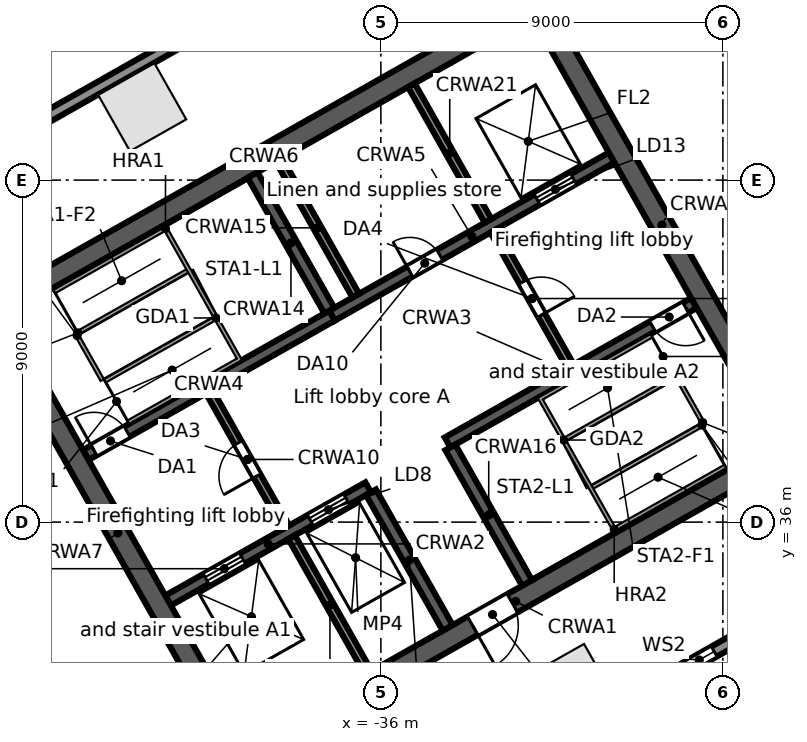
"""IFC4 building model, lengths in metres.
Left out: names, types, materials, properties, quantities, classifications, styles, units other than length and angle.
Written with IfcOpenShell. Run it as: python <this file> out.ifc"""

import sys

from ifc_helpers import new_model, si_unit, direction, frame, frame_2d, origin, origin_2d, place, context, subcontext, project, spatial, rectangle, extrude, element, fill, save


model = new_model("IFC4")
c1 = context("Model", 3, precision=1e-05, world=origin(), true_north=direction((0.0, 1.0)))
c2 = subcontext(c1, "Body", "Model", "MODEL_VIEW")
j1 = project(units=[si_unit("LENGTHUNIT", "METRE"), si_unit("PLANEANGLEUNIT", "RADIAN")], contexts=[c1])
p1 = place(None, origin())
s1 = spatial("IfcSite", under=j1, at=p1, CompositionType="ELEMENT")
p2 = place(p1, origin())
s2 = spatial("IfcBuilding", under=s1, at=p2, CompositionType="ELEMENT")
p3 = place(p2, frame((0.0, 0.0, 145.5)))
s3 = spatial("IfcBuildingStorey", under=s2, at=p3, CompositionType="ELEMENT", Elevation=145.5)
for number, where, z_axis, x_axis in (
    (1, (-42.28, 46.919, 0.0), (0.0, 0.0, 1.0), (-0.87, -0.492, 0.0)),
    (2, (-30.976, 31.635, 0.0), (0.0, 0.0, 1.0), (0.87, 0.492, 0.0)),
):
    element("IfcColumn", number, at=place(p3, frame(where, z_axis=z_axis, x_axis=x_axis)), inside=s3, PredefinedType="COLUMN", context=c2, shape_type="SweptSolid", body=[
        extrude(rectangle(XDim=1.7, YDim=1.7, at=origin_2d()), origin(), (0.0, 0.0, 1.0), 4.4),
    ])
p4 = place(p3, frame((-58.745, 38.764, 0.0), z_axis=(0.0, 0.0, 1.0), x_axis=(0.870355811726, 0.492423355453, 0.0)))
e3 = element("IfcWall", 3, at=p4, inside=s3, PredefinedType="STANDARD", context=c2, shape_type="SweptSolid", body=[
    extrude(rectangle(XDim=64.025, YDim=0.3, at=frame_2d((32.013, 0.0))), origin(), (0.0, 0.0, 1.0), 4.05),
])
p5 = place(p4, frame((60.122, 0.0, 0.6)))
e4 = element("IfcOpeningElement", 4, at=p5, cuts=e3, PredefinedType="OPENING", context=c2, shape_type="SweptSolid", body=[
    extrude(rectangle(XDim=0.9, YDim=2.8, at=frame_2d((0.45, 1.4))), frame((0.0, 0.16, 0.0), z_axis=(0.0, -1.0, 0.0), x_axis=(1.0, 0.0, 0.0)), (0.0, 0.0, 1.0), 0.32),
])
p6 = place(p4, frame((50.992, 0.0, 0.6)))
e5 = element("IfcOpeningElement", 5, at=p6, cuts=e3, PredefinedType="OPENING", context=c2, shape_type="SweptSolid", body=[
    extrude(rectangle(XDim=0.9, YDim=2.8, at=frame_2d((0.45, 1.4))), frame((0.0, 0.16, 0.0), z_axis=(0.0, -1.0, 0.0), x_axis=(1.0, 0.0, 0.0)), (0.0, 0.0, 1.0), 0.32),
])
p7 = place(p4, frame((41.862, 0.0, 0.6)))
e6 = element("IfcOpeningElement", 6, at=p7, cuts=e3, PredefinedType="OPENING", context=c2, shape_type="SweptSolid", body=[
    extrude(rectangle(XDim=0.9, YDim=2.8, at=frame_2d((0.45, 1.4))), frame((0.0, 0.16, 0.0), z_axis=(0.0, -1.0, 0.0), x_axis=(1.0, 0.0, 0.0)), (0.0, 0.0, 1.0), 0.32),
])
p8 = place(p4, frame((32.732, 0.0, 0.6)))
e7 = element("IfcOpeningElement", 7, at=p8, cuts=e3, PredefinedType="OPENING", context=c2, shape_type="SweptSolid", body=[
    extrude(rectangle(XDim=0.9, YDim=2.8, at=frame_2d((0.45, 1.4))), frame((0.0, 0.16, 0.0), z_axis=(0.0, -1.0, 0.0), x_axis=(1.0, 0.0, 0.0)), (0.0, 0.0, 1.0), 0.32),
])
p9 = place(p4, frame((23.602, 0.0, 0.6)))
e8 = element("IfcOpeningElement", 8, at=p9, cuts=e3, PredefinedType="OPENING", context=c2, shape_type="SweptSolid", body=[
    extrude(rectangle(XDim=0.9, YDim=2.8, at=frame_2d((0.45, 1.4))), frame((0.0, 0.16, 0.0), z_axis=(0.0, -1.0, 0.0), x_axis=(1.0, 0.0, 0.0)), (0.0, 0.0, 1.0), 0.32),
])
p10 = place(p4, frame((14.472, 0.0, 0.6)))
e9 = element("IfcOpeningElement", 9, at=p10, cuts=e3, PredefinedType="OPENING", context=c2, shape_type="SweptSolid", body=[
    extrude(rectangle(XDim=0.9, YDim=2.8, at=frame_2d((0.45, 1.4))), frame((0.0, 0.16, 0.0), z_axis=(0.0, -1.0, 0.0), x_axis=(1.0, 0.0, 0.0)), (0.0, 0.0, 1.0), 0.32),
])
p11 = place(p4, frame((5.342, 0.0, 0.6)))
e10 = element("IfcOpeningElement", 10, at=p11, cuts=e3, PredefinedType="OPENING", context=c2, shape_type="SweptSolid", body=[
    extrude(rectangle(XDim=0.9, YDim=2.8, at=frame_2d((0.45, 1.4))), frame((0.0, 0.16, 0.0), z_axis=(0.0, -1.0, 0.0), x_axis=(1.0, 0.0, 0.0)), (0.0, 0.0, 1.0), 0.32),
])
p12 = place(p3, frame((-44.109, 26.504, 0.0), z_axis=(0.0, 0.0, 1.0), x_axis=(-0.857169502585, 0.515034410344, 0.0)))
e11 = element("IfcWall", 11, at=p12, inside=s3, PredefinedType="STANDARD", context=c2, shape_type="SweptSolid", body=[
    extrude(rectangle(XDim=17.127, YDim=0.3, at=frame_2d((8.563, 0.0))), origin(), (0.0, 0.0, 1.0), 4.05),
])
p13 = place(p12, frame((13.403, 0.0, 0.6)))
e12 = element("IfcOpeningElement", 12, at=p13, cuts=e11, PredefinedType="OPENING", context=c2, shape_type="SweptSolid", body=[
    extrude(rectangle(XDim=0.9, YDim=2.8, at=frame_2d((0.45, 1.4))), frame((0.0, 0.16, 0.0), z_axis=(0.0, -1.0, 0.0), x_axis=(1.0, 0.0, 0.0)), (0.0, 0.0, 1.0), 0.32),
])
p14 = place(p12, frame((4.903, 0.0, 0.6)))
e13 = element("IfcOpeningElement", 13, at=p14, cuts=e11, PredefinedType="OPENING", context=c2, shape_type="SweptSolid", body=[
    extrude(rectangle(XDim=0.9, YDim=2.8, at=frame_2d((0.45, 1.4))), frame((0.0, 0.16, 0.0), z_axis=(0.0, -1.0, 0.0), x_axis=(1.0, 0.0, 0.0)), (0.0, 0.0, 1.0), 0.32),
])
p15 = place(p3, frame((-0.055, 47.969, 0.0), z_axis=(0.0, 0.0, 1.0), x_axis=(-0.870355730478, -0.492423499058, 0.0)))
e14 = element("IfcWall", 14, at=p15, inside=s3, PredefinedType="STANDARD", context=c2, shape_type="SweptSolid", body=[
    extrude(rectangle(XDim=43.75, YDim=0.3, at=frame_2d((21.875, 0.0))), origin(), (0.0, 0.0, 1.0), 4.05),
])
p16 = place(p15, frame((39.977, 0.0, 0.6)))
e15 = element("IfcOpeningElement", 15, at=p16, cuts=e14, PredefinedType="OPENING", context=c2, shape_type="SweptSolid", body=[
    extrude(rectangle(XDim=0.9, YDim=2.8, at=frame_2d((0.45, 1.4))), frame((0.0, 0.16, 0.0), z_axis=(0.0, -1.0, 0.0), x_axis=(1.0, 0.0, 0.0)), (0.0, 0.0, 1.0), 0.32),
])
p17 = place(p15, frame((31.222, 0.0, 0.6)))
e16 = element("IfcOpeningElement", 16, at=p17, cuts=e14, PredefinedType="OPENING", context=c2, shape_type="SweptSolid", body=[
    extrude(rectangle(XDim=0.9, YDim=2.8, at=frame_2d((0.45, 1.4))), frame((0.0, 0.16, 0.0), z_axis=(0.0, -1.0, 0.0), x_axis=(1.0, 0.0, 0.0)), (0.0, 0.0, 1.0), 0.32),
])
p18 = place(p15, frame((22.468, 0.0, 0.6)))
e17 = element("IfcOpeningElement", 17, at=p18, cuts=e14, PredefinedType="OPENING", context=c2, shape_type="SweptSolid", body=[
    extrude(rectangle(XDim=0.9, YDim=2.8, at=frame_2d((0.45, 1.4))), frame((0.0, 0.16, 0.0), z_axis=(0.0, -1.0, 0.0), x_axis=(1.0, 0.0, 0.0)), (0.0, 0.0, 1.0), 0.32),
])
p19 = place(p15, frame((13.713, 0.0, 0.6)))
e18 = element("IfcOpeningElement", 18, at=p19, cuts=e14, PredefinedType="OPENING", context=c2, shape_type="SweptSolid", body=[
    extrude(rectangle(XDim=0.9, YDim=2.8, at=frame_2d((0.45, 1.4))), frame((0.0, 0.16, 0.0), z_axis=(0.0, -1.0, 0.0), x_axis=(1.0, 0.0, 0.0)), (0.0, 0.0, 1.0), 0.32),
])
p20 = place(p15, frame((4.959, 0.0, 0.6)))
e19 = element("IfcOpeningElement", 19, at=p20, cuts=e14, PredefinedType="OPENING", context=c2, shape_type="SweptSolid", body=[
    extrude(rectangle(XDim=0.9, YDim=2.8, at=frame_2d((0.45, 1.4))), frame((0.0, 0.16, 0.0), z_axis=(0.0, -1.0, 0.0), x_axis=(1.0, 0.0, 0.0)), (0.0, 0.0, 1.0), 0.32),
])
p21 = place(p3, frame((-39.85, 29.727, 0.0), z_axis=(0.0, 0.0, 1.0), x_axis=(0.870359753402, 0.492416388494, 0.0)))
e20 = element("IfcWall", 20, at=p21, inside=s3, PredefinedType="SOLIDWALL", context=c2, shape_type="SweptSolid", body=[
    extrude(rectangle(XDim=17.0, YDim=0.55, at=frame_2d((8.5, 0.0))), origin(), (0.0, 0.0, 1.0), 4.05),
])
p22 = place(p21, frame((7.2, 0.0, 0.0)))
e21 = element("IfcOpeningElement", 21, at=p22, cuts=e20, PredefinedType="OPENING", context=c2, shape_type="SweptSolid", body=[
    extrude(rectangle(XDim=1.2, YDim=2.1, at=frame_2d((0.6, 1.05))), frame((0.0, 0.285, 0.0), z_axis=(0.0, -1.0, 0.0), x_axis=(1.0, 0.0, 0.0)), (0.0, 0.0, 1.0), 0.57),
])
p23 = place(p3, frame((-41.6, 33.936, 0.0), z_axis=(0.0, 0.0, 1.0), x_axis=(0.870348557882, 0.492436176365, 0.0)))
e22 = element("IfcWall", 22, at=p23, inside=s3, PredefinedType="SOLIDWALL", context=c2, shape_type="SweptSolid", body=[
    extrude(rectangle(XDim=6.05, YDim=0.3, at=frame_2d((3.025, 0.0))), origin(), (0.0, 0.0, 1.0), 4.05),
])
p24 = place(p23, frame((1.15, 0.0, 0.0)))
e23 = element("IfcOpeningElement", 23, at=p24, cuts=e22, PredefinedType="OPENING", context=c2, shape_type="SweptSolid", body=[
    extrude(rectangle(XDim=1.1, YDim=2.1, at=frame_2d((0.55, 1.05))), frame((0.0, 0.16, 0.0), z_axis=(0.0, -1.0, 0.0), x_axis=(1.0, 0.0, 0.0)), (0.0, 0.0, 1.0), 0.32),
])
p25 = place(p23, frame((4.3, 0.0, 0.0)))
e24 = element("IfcOpeningElement", 24, at=p25, cuts=e22, PredefinedType="OPENING", context=c2, shape_type="SweptSolid", body=[
    extrude(rectangle(XDim=1.1, YDim=2.1, at=frame_2d((0.55, 1.05))), frame((0.0, 0.16, 0.0), z_axis=(0.0, -1.0, 0.0), x_axis=(1.0, 0.0, 0.0)), (0.0, 0.0, 1.0), 0.32),
])
p26 = place(p3, frame((-34.245, 38.097, 0.0), z_axis=(0.0, 0.0, 1.0), x_axis=(0.870360741098, 0.49241464271, 0.0)))
e25 = element("IfcWall", 25, at=p26, inside=s3, PredefinedType="SOLIDWALL", context=c2, shape_type="SweptSolid", body=[
    extrude(rectangle(XDim=7.45, YDim=0.3, at=frame_2d((3.725, 0.0))), origin(), (0.0, 0.0, 1.0), 4.05),
])
p27 = place(p26, frame((6.2, 0.0, 0.0)))
e26 = element("IfcOpeningElement", 26, at=p27, cuts=e25, PredefinedType="OPENING", context=c2, shape_type="SweptSolid", body=[
    extrude(rectangle(XDim=1.0, YDim=2.1, at=frame_2d((0.5, 1.05))), frame((0.0, 0.16, 0.0), z_axis=(0.0, -1.0, 0.0), x_axis=(1.0, 0.0, 0.0)), (0.0, 0.0, 1.0), 0.32),
])
p28 = place(p3, frame((-43.766, 37.766, 0.0), z_axis=(0.0, 0.0, 1.0), x_axis=(0.870346696097, 0.492439466932, 0.0)))
e27 = element("IfcWall", 27, at=p28, inside=s3, PredefinedType="SOLIDWALL", context=c2, shape_type="SweptSolid", body=[
    extrude(rectangle(XDim=7.45, YDim=0.3, at=frame_2d((3.725, 0.0))), origin(), (0.0, 0.0, 1.0), 4.05),
])
p29 = place(p28, frame((0.25, 0.0, 0.0)))
e28 = element("IfcOpeningElement", 28, at=p29, cuts=e27, PredefinedType="OPENING", context=c2, shape_type="SweptSolid", body=[
    extrude(rectangle(XDim=1.0, YDim=2.1, at=frame_2d((0.5, 1.05))), frame((0.0, 0.16, 0.0), z_axis=(0.0, -1.0, 0.0), x_axis=(1.0, 0.0, 0.0)), (0.0, 0.0, 1.0), 0.32),
])
p30 = place(p3, frame((-37.282, 41.435, 0.0), z_axis=(0.0, 0.0, 1.0), x_axis=(0.870359895813, 0.492416136779, 0.0)))
e29 = element("IfcWall", 29, at=p30, inside=s3, PredefinedType="SOLIDWALL", context=c2, shape_type="SweptSolid", body=[
    extrude(rectangle(XDim=8.45, YDim=0.3, at=frame_2d((4.225, 0.0))), origin(), (0.0, 0.0, 1.0), 4.05),
])
p31 = place(p30, frame((6.2, 0.0, 0.0)))
e30 = element("IfcOpeningElement", 30, at=p31, cuts=e29, PredefinedType="OPENING", context=c2, shape_type="SweptSolid", body=[
    extrude(rectangle(XDim=1.1, YDim=2.1, at=frame_2d((0.55, 1.05))), frame((0.0, 0.16, 0.0), z_axis=(0.0, -1.0, 0.0), x_axis=(1.0, 0.0, 0.0)), (0.0, 0.0, 1.0), 0.32),
])
p32 = place(p30, frame((2.35, 0.0, 0.0)))
e31 = element("IfcOpeningElement", 31, at=p32, cuts=e29, PredefinedType="OPENING", context=c2, shape_type="SweptSolid", body=[
    extrude(rectangle(XDim=0.9, YDim=2.1, at=frame_2d((0.45, 1.05))), frame((0.0, 0.16, 0.0), z_axis=(0.0, -1.0, 0.0), x_axis=(1.0, 0.0, 0.0)), (0.0, 0.0, 1.0), 0.32),
])
p33 = place(p3, frame((-46.473, 41.434, 0.0), z_axis=(0.0, 0.0, 1.0), x_axis=(0.870359753402, 0.492416388494, 0.0)))
e32 = element("IfcWall", 32, at=p33, inside=s3, PredefinedType="SOLIDWALL", context=c2, shape_type="SweptSolid", body=[
    extrude(rectangle(XDim=17.0, YDim=0.55, at=frame_2d((8.5, 0.0))), origin(), (0.0, 0.0, 1.0), 4.05),
])
p34 = place(p3, frame((-46.098, 41.33, 0.0), z_axis=(0.0, 0.0, 1.0), x_axis=(0.492418910884, -0.870358326325, 0.0)))
e33 = element("IfcWall", 33, at=p34, inside=s3, PredefinedType="SOLIDWALL", context=c2, shape_type="SweptSolid", body=[
    extrude(rectangle(XDim=12.9, YDim=0.55, at=frame_2d((6.45, 0.0))), origin(), (0.0, 0.0, 1.0), 4.05),
])
p35 = place(p3, frame((-38.349, 35.603, 0.0), z_axis=(0.0, 0.0, 1.0), x_axis=(0.492382931784, -0.870378681085, 0.0)))
e34 = element("IfcWall", 34, at=p35, inside=s3, PredefinedType="SOLIDWALL", context=c2, shape_type="SweptSolid", body=[
    extrude(rectangle(XDim=4.1, YDim=0.2, at=frame_2d((2.05, 0.0))), origin(), (0.0, 0.0, 1.0), 4.05),
])
p36 = place(p3, frame((-40.516, 39.433, 0.0), z_axis=(0.0, 0.0, 1.0), x_axis=(0.492453559952, -0.87033872216, 0.0)))
e35 = element("IfcWall", 35, at=p36, inside=s3, PredefinedType="PARTITIONING", context=c2, shape_type="SweptSolid", body=[
    extrude(rectangle(XDim=4.1, YDim=0.2, at=frame_2d((2.05, 0.0))), origin(), (0.0, 0.0, 1.0), 4.05),
])
p37 = place(p36, frame((1.55, 0.0, 0.0)))
e36 = element("IfcOpeningElement", 36, at=p37, cuts=e35, PredefinedType="OPENING", context=c2, shape_type="SweptSolid", body=[
    extrude(rectangle(XDim=1.0, YDim=2.1, at=frame_2d((0.5, 1.05))), frame((0.0, 0.11, 0.0), z_axis=(0.0, -1.0, 0.0), x_axis=(1.0, 0.0, 0.0)), (0.0, 0.0, 1.0), 0.22),
])
p38 = place(p3, frame((-36.26, 36.785, 0.0), z_axis=(0.0, 0.0, 1.0), x_axis=(0.492408451753, -0.87036424366, 0.0)))
e37 = element("IfcWall", 37, at=p38, inside=s3, PredefinedType="SOLIDWALL", context=c2, shape_type="SweptSolid", body=[
    extrude(rectangle(XDim=4.1, YDim=0.3, at=frame_2d((2.05, 0.0))), origin(), (0.0, 0.0, 1.0), 4.05),
])
p39 = place(p3, frame((-39.375, 45.134, 0.0), z_axis=(0.0, 0.0, 1.0), x_axis=(0.492428039142, -0.870353161807, 0.0)))
e38 = element("IfcWall", 38, at=p39, inside=s3, PredefinedType="SOLIDWALL", context=c2, shape_type="SweptSolid", body=[
    extrude(rectangle(XDim=4.1, YDim=0.3, at=frame_2d((2.05, 0.0))), origin(), (0.0, 0.0, 1.0), 4.05),
])
p40 = place(p3, frame((-38.679, 45.527, 0.0), z_axis=(0.0, 0.0, 1.0), x_axis=(0.492453559952, -0.87033872216, 0.0)))
e39 = element("IfcWall", 39, at=p40, inside=s3, PredefinedType="SOLIDWALL", context=c2, shape_type="SweptSolid", body=[
    extrude(rectangle(XDim=4.1, YDim=0.2, at=frame_2d((2.05, 0.0))), origin(), (0.0, 0.0, 1.0), 4.05),
])
p41 = place(p3, frame((-34.171, 37.967, 0.0), z_axis=(0.0, 0.0, 1.0), x_axis=(0.492382931784, -0.870378681085, 0.0)))
e40 = element("IfcWall", 40, at=p41, inside=s3, PredefinedType="SOLIDWALL", context=c2, shape_type="SweptSolid", body=[
    extrude(rectangle(XDim=4.1, YDim=0.3, at=frame_2d((2.05, 0.0))), origin(), (0.0, 0.0, 1.0), 4.05),
])
p42 = place(p3, frame((-33.031, 43.667, 0.0), z_axis=(0.0, 0.0, 1.0), x_axis=(0.492408451753, -0.87036424366, 0.0)))
e41 = element("IfcWall", 41, at=p42, inside=s3, PredefinedType="PARTITIONING", context=c2, shape_type="SweptSolid", body=[
    extrude(rectangle(XDim=4.1, YDim=0.2, at=frame_2d((2.05, 0.0))), origin(), (0.0, 0.0, 1.0), 4.05),
])
p43 = place(p42, frame((1.55, 0.0, 0.0)))
e42 = element("IfcOpeningElement", 42, at=p43, cuts=e41, PredefinedType="OPENING", context=c2, shape_type="SweptSolid", body=[
    extrude(rectangle(XDim=1.0, YDim=2.1, at=frame_2d((0.5, 1.05))), frame((0.0, 0.11, 0.0), z_axis=(0.0, -1.0, 0.0), x_axis=(1.0, 0.0, 0.0)), (0.0, 0.0, 1.0), 0.22),
])
p44 = place(p3, frame((-35.197, 47.497, 0.0), z_axis=(0.0, 0.0, 1.0), x_axis=(0.492453559952, -0.87033872216, 0.0)))
e43 = element("IfcWall", 43, at=p44, inside=s3, PredefinedType="SOLIDWALL", context=c2, shape_type="SweptSolid", body=[
    extrude(rectangle(XDim=4.1, YDim=0.2, at=frame_2d((2.05, 0.0))), origin(), (0.0, 0.0, 1.0), 4.05),
])
p45 = place(p3, frame((-31.781, 49.43, 0.0), z_axis=(0.0, 0.0, 1.0), x_axis=(0.492427022044, -0.870353737259, 0.0)))
e44 = element("IfcWall", 44, at=p45, inside=s3, PredefinedType="SOLIDWALL", context=c2, shape_type="SweptSolid", body=[
    extrude(rectangle(XDim=12.9, YDim=0.55, at=frame_2d((6.45, 0.0))), origin(), (0.0, 0.0, 1.0), 4.05),
])
p46 = place(p17, origin())
e45 = element("IfcWindow", 45, at=p46, inside=s3, PartitioningType="SINGLE_PANEL", PredefinedType="WINDOW", context=c2, shape_type="SweptSolid", body=[
    extrude(rectangle(XDim=0.9, YDim=2.8, at=frame_2d((0.45, 1.4))), frame((0.0, 0.03, 0.0), z_axis=(0.0, -1.0, 0.0), x_axis=(1.0, 0.0, 0.0)), (0.0, 0.0, 1.0), 0.06),
])
fill(e16, e45)
p47 = place(p31, origin())
e46 = element("IfcDoor", 46, at=p47, inside=s3, OperationType="DOUBLE_DOOR_SLIDING", PredefinedType="DOOR", context=c2, shape_type="SweptSolid", body=[
    extrude(rectangle(XDim=1.1, YDim=2.1, at=frame_2d((0.55, 1.05))), frame((0.0, 0.025, 0.0), z_axis=(0.0, -1.0, 0.0), x_axis=(1.0, 0.0, 0.0)), (0.0, 0.0, 1.0), 0.05),
])
fill(e30, e46)
p48 = place(p24, origin())
e47 = element("IfcDoor", 47, at=p48, inside=s3, OperationType="DOUBLE_DOOR_SLIDING", PredefinedType="DOOR", context=c2, shape_type="SweptSolid", body=[
    extrude(rectangle(XDim=1.1, YDim=2.1, at=frame_2d((0.55, 1.05))), frame((0.0, 0.025, 0.0), z_axis=(0.0, -1.0, 0.0), x_axis=(1.0, 0.0, 0.0)), (0.0, 0.0, 1.0), 0.05),
])
fill(e23, e47)
p49 = place(p25, origin())
e48 = element("IfcDoor", 48, at=p49, inside=s3, OperationType="DOUBLE_DOOR_SLIDING", PredefinedType="DOOR", context=c2, shape_type="SweptSolid", body=[
    extrude(rectangle(XDim=1.1, YDim=2.1, at=frame_2d((0.55, 1.05))), frame((0.0, 0.025, 0.0), z_axis=(0.0, -1.0, 0.0), x_axis=(1.0, 0.0, 0.0)), (0.0, 0.0, 1.0), 0.05),
])
fill(e24, e48)
p50 = place(p29, origin())
e49 = element("IfcDoor", 49, at=p50, inside=s3, OperationType="SINGLE_SWING_LEFT", PredefinedType="DOOR", context=c2, shape_type="SweptSolid", body=[
    extrude(rectangle(XDim=1.0, YDim=2.1, at=frame_2d((0.5, 1.05))), frame((0.0, 0.025, 0.0), z_axis=(0.0, -1.0, 0.0), x_axis=(1.0, 0.0, 0.0)), (0.0, 0.0, 1.0), 0.05),
])
fill(e28, e49)
p51 = place(p27, frame((1.0, 0.0, 0.0), z_axis=(0.0, 0.0, 1.0), x_axis=(-1.0, 0.0, 0.0)))
e50 = element("IfcDoor", 50, at=p51, inside=s3, OperationType="SINGLE_SWING_LEFT", PredefinedType="DOOR", context=c2, shape_type="SweptSolid", body=[
    extrude(rectangle(XDim=1.0, YDim=2.1, at=frame_2d((0.5, 1.05))), frame((0.0, 0.025, 0.0), z_axis=(0.0, -1.0, 0.0), x_axis=(1.0, 0.0, 0.0)), (0.0, 0.0, 1.0), 0.05),
])
fill(e26, e50)
p52 = place(p37, frame((1.0, 0.0, 0.0), z_axis=(0.0, 0.0, 1.0), x_axis=(-1.0, 0.0, 0.0)))
e51 = element("IfcDoor", 51, at=p52, inside=s3, OperationType="SINGLE_SWING_LEFT", PredefinedType="DOOR", context=c2, shape_type="SweptSolid", body=[
    extrude(rectangle(XDim=1.0, YDim=2.1, at=frame_2d((0.5, 1.05))), frame((0.0, 0.025, 0.0), z_axis=(0.0, -1.0, 0.0), x_axis=(1.0, 0.0, 0.0)), (0.0, 0.0, 1.0), 0.05),
])
fill(e36, e51)
p53 = place(p43, origin())
e52 = element("IfcDoor", 52, at=p53, inside=s3, OperationType="SINGLE_SWING_RIGHT", PredefinedType="DOOR", context=c2, shape_type="SweptSolid", body=[
    extrude(rectangle(XDim=1.0, YDim=2.1, at=frame_2d((0.5, 1.05))), frame((0.0, 0.025, 0.0), z_axis=(0.0, -1.0, 0.0), x_axis=(1.0, 0.0, 0.0)), (0.0, 0.0, 1.0), 0.05),
])
fill(e42, e52)
p54 = place(p22, frame((1.2, 0.0, 0.0), z_axis=(0.0, 0.0, 1.0), x_axis=(-1.0, 0.0, 0.0)))
e53 = element("IfcDoor", 53, at=p54, inside=s3, OperationType="SINGLE_SWING_RIGHT", PredefinedType="DOOR", context=c2, shape_type="SweptSolid", body=[
    extrude(rectangle(XDim=1.2, YDim=2.1, at=frame_2d((0.6, 1.05))), frame((0.0, 0.025, 0.0), z_axis=(0.0, -1.0, 0.0), x_axis=(1.0, 0.0, 0.0)), (0.0, 0.0, 1.0), 0.05),
])
fill(e21, e53)
p55 = place(p32, origin())
e54 = element("IfcDoor", 54, at=p55, inside=s3, OperationType="SINGLE_SWING_LEFT", PredefinedType="DOOR", context=c2, shape_type="SweptSolid", body=[
    extrude(rectangle(XDim=0.9, YDim=2.1, at=frame_2d((0.45, 1.05))), frame((0.0, 0.025, 0.0), z_axis=(0.0, -1.0, 0.0), x_axis=(1.0, 0.0, 0.0)), (0.0, 0.0, 1.0), 0.05),
])
fill(e31, e54)
save(model, sys.argv[1])
